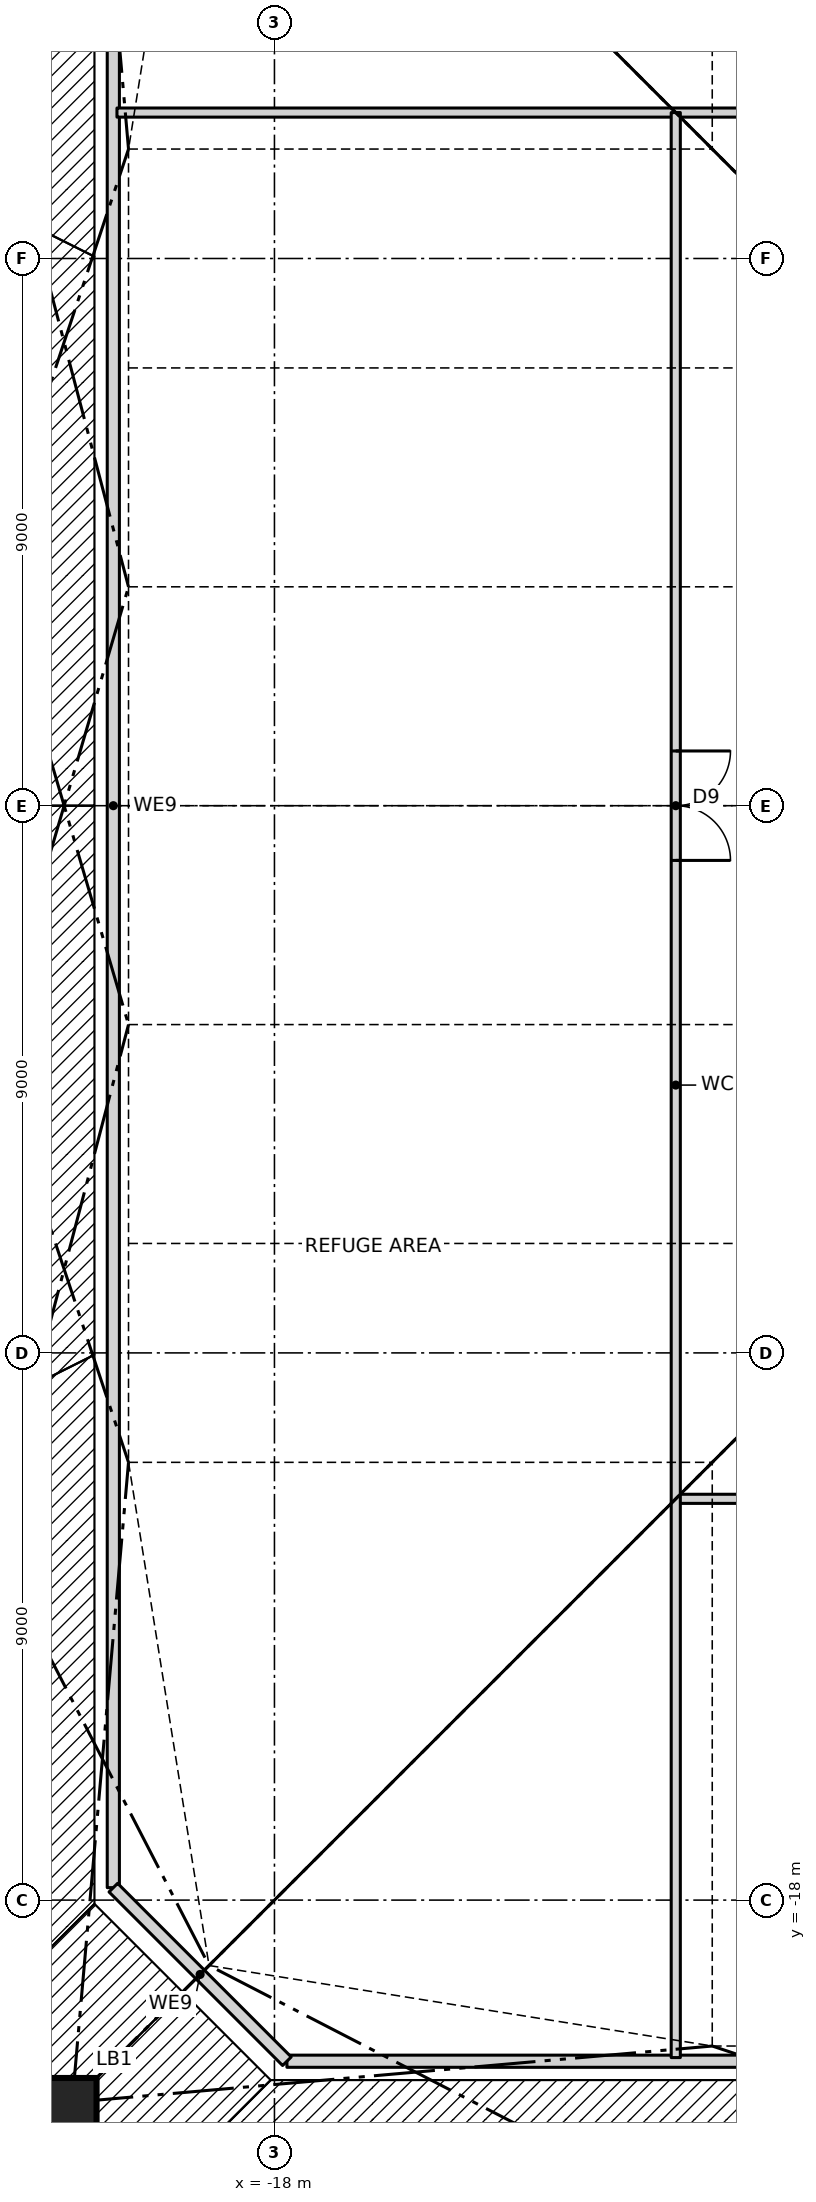
"""IFC4 building model, lengths in metres.
Left out: names, types, materials, properties, quantities, classifications, styles, units other than length and angle.
Written with IfcOpenShell. Run it as: python <this file> out.ifc"""

import sys

from ifc_helpers import new_model, si_unit, direction, frame, frame_2d, origin, origin_2d, place, context, subcontext, project, spatial, rectangle, hollow_rectangle, extrude, clip, halfspace, element, fill, save


model = new_model("IFC4")
c1 = context("Model", 3, precision=1e-05, world=origin(), true_north=direction((0.0, 1.0)))
c2 = subcontext(c1, "Body", "Model", "MODEL_VIEW")
j1 = project(units=[si_unit("LENGTHUNIT", "METRE"), si_unit("PLANEANGLEUNIT", "RADIAN")], contexts=[c1])
p1 = place(None, origin())
s1 = spatial("IfcSite", under=j1, at=p1, CompositionType="ELEMENT")
p2 = place(p1, origin())
s2 = spatial("IfcBuilding", under=s1, at=p2, CompositionType="ELEMENT")
p3 = place(p2, frame((0.0, 0.0, 74.5)))
s3 = spatial("IfcBuildingStorey", under=s2, at=p3, CompositionType="ELEMENT", Elevation=74.5)
p4 = place(p3, frame((-21.326, -21.326, 0.0), z_axis=(0.331294578225, 0.331294578225, 0.883452208599), x_axis=(-0.707106781187, 0.707106781187, 0.0)))
e1 = element("IfcColumn", 1, at=p4, inside=s3, PredefinedType="COLUMN", context=c2, shape_type="Clipping", body=[
    clip(clip(extrude(hollow_rectangle(XDim=0.8, YDim=0.8, WallThickness=0.18, at=origin_2d()), origin(), (0.0, 0.0, 1.0), 6.792), halfspace(frame((0.0, 0.0, 0.0), z_axis=(0.0, -0.468521285666, -0.883452208599), x_axis=(-0.707106781187, -0.624695047554, 0.331294578225)), False)), halfspace(frame((0.0, 2.811, 5.301), z_axis=(0.0, 0.468521285666, 0.883452208599), x_axis=(-0.707106781187, -0.624695047554, 0.331294578225)), False)),
])
p5 = place(p3, frame((-12.15, -22.65, 0.0), z_axis=(0.206127500627, 0.343583115532, 0.91622164142), x_axis=(-0.857517554715, 0.514454704863, 0.0)))
e2 = element("IfcColumn", 2, at=p5, inside=s3, PredefinedType="COLUMN", context=c2, shape_type="Clipping", body=[
    clip(clip(extrude(hollow_rectangle(XDim=0.8, YDim=0.8, WallThickness=0.09, at=origin_2d()), origin(), (0.0, 0.0, 1.0), 6.549), halfspace(frame((0.0, 0.0, 0.0), z_axis=(0.0, -0.400671815572, -0.91622164142), x_axis=(-0.857517554715, -0.471354534126, 0.206127500627)), False)), halfspace(frame((0.0, 2.404, 5.497), z_axis=(0.0, 0.400671815572, 0.91622164142), x_axis=(-0.857517554715, -0.471354534126, 0.206127500627)), False)),
])
p6 = place(p3, frame((-22.65, 12.15, 0.0), z_axis=(0.343583115532, -0.206127500627, 0.91622164142), x_axis=(0.514454704863, 0.857517554715, 0.0)))
e3 = element("IfcColumn", 3, at=p6, inside=s3, PredefinedType="COLUMN", context=c2, shape_type="Clipping", body=[
    clip(clip(extrude(hollow_rectangle(XDim=0.8, YDim=0.8, WallThickness=0.09, at=origin_2d()), origin(), (0.0, 0.0, 1.0), 6.549), halfspace(frame((0.0, 0.0, 0.0), z_axis=(0.0, -0.400671815572, -0.91622164142), x_axis=(0.514454704863, -0.785676141527, 0.343583115532)), False)), halfspace(frame((0.0, 2.404, 5.497), z_axis=(0.0, 0.400671815572, 0.91622164142), x_axis=(0.514454704863, -0.785676141527, 0.343583115532)), False)),
])
p7 = place(p3, frame((-22.65, 4.05, 0.0), z_axis=(0.350261033367, -0.070044605522, 0.934029422311), x_axis=(0.196095673508, 0.980584767795, 0.0)))
e4 = element("IfcColumn", 4, at=p7, inside=s3, PredefinedType="COLUMN", context=c2, shape_type="Clipping", body=[
    clip(clip(extrude(hollow_rectangle(XDim=0.8, YDim=0.8, WallThickness=0.09, at=origin_2d()), origin(), (0.0, 0.0, 1.0), 6.424), halfspace(frame((0.0, 0.0, 0.0), z_axis=(0.0, -0.357196078167, -0.934029422311), x_axis=(0.196095673508, -0.91589502419, 0.350261033367)), False)), halfspace(frame((0.0, 2.143, 5.604), z_axis=(0.0, 0.357196078167, 0.934029422311), x_axis=(0.196095673508, -0.91589502419, 0.350261033367)), False)),
])
p8 = place(p3, frame((-22.65, -4.05, 0.0), z_axis=(0.350261033367, 0.070044605522, 0.934029422311), x_axis=(-0.196095673508, 0.980584767795, 0.0)))
e5 = element("IfcColumn", 5, at=p8, inside=s3, PredefinedType="COLUMN", context=c2, shape_type="Clipping", body=[
    clip(clip(extrude(hollow_rectangle(XDim=0.8, YDim=0.8, WallThickness=0.09, at=origin_2d()), origin(), (0.0, 0.0, 1.0), 6.424), halfspace(frame((0.0, 0.0, 0.0), z_axis=(0.0, -0.357196078167, -0.934029422311), x_axis=(-0.196095673508, -0.91589502419, 0.350261033367)), False)), halfspace(frame((0.0, 2.143, 5.604), z_axis=(0.0, 0.357196078167, 0.934029422311), x_axis=(-0.196095673508, -0.91589502419, 0.350261033367)), False)),
])
p9 = place(p3, frame((-22.65, -12.15, 0.0), z_axis=(0.343583115532, 0.206127500627, 0.91622164142), x_axis=(-0.514454704863, 0.857517554715, 0.0)))
e6 = element("IfcColumn", 6, at=p9, inside=s3, PredefinedType="COLUMN", context=c2, shape_type="Clipping", body=[
    clip(clip(extrude(hollow_rectangle(XDim=0.8, YDim=0.8, WallThickness=0.09, at=origin_2d()), origin(), (0.0, 0.0, 1.0), 6.549), halfspace(frame((0.0, 0.0, 0.0), z_axis=(0.0, -0.400671815572, -0.91622164142), x_axis=(-0.514454704863, -0.785676141527, 0.343583115532)), False)), halfspace(frame((0.0, 2.404, 5.497), z_axis=(0.0, 0.400671815572, 0.91622164142), x_axis=(-0.514454704863, -0.785676141527, 0.343583115532)), False)),
])
for number, where, z_axis, x_axis in (
    (7, (-17.795, -20.65, 0.0), (0.0, 0.0, 1.0), (1.0, 0.0, 0.0)),
    (8, (-20.65, 17.795, 0.0), (0.0, 0.0, 1.0), (0.0, -1.0, 0.0)),
):
    element("IfcWall", number, at=place(p3, frame(where, z_axis=z_axis, x_axis=x_axis)), inside=s3, PredefinedType="PARTITIONING", context=c2, shape_type="SweptSolid", body=[
        extrude(rectangle(XDim=35.59, YDim=0.2, at=frame_2d((17.795, 0.0))), origin(), (0.0, 0.0, 1.0), 5.7),
    ])
p10 = place(p3, frame((-20.65, -17.795, 0.0), z_axis=(0.0, 0.0, 1.0), x_axis=(0.707106781187, -0.707106781187, 0.0)))
e9 = element("IfcWall", 9, at=p10, inside=s3, PredefinedType="PARTITIONING", context=c2, shape_type="SweptSolid", body=[
    extrude(rectangle(XDim=4.038, YDim=0.2, at=frame_2d((2.019, 0.0))), origin(), (0.0, 0.0, 1.0), 5.7),
])
p11 = place(p3, frame((-11.4, -11.4, 0.0), z_axis=(0.0, 0.0, 1.0), x_axis=(1.0, 0.0, 0.0)))
e10 = element("IfcWall", 10, at=p11, inside=s3, PredefinedType="PARTITIONING", context=c2, shape_type="SweptSolid", body=[
    extrude(rectangle(XDim=31.99, YDim=0.15, at=frame_2d((15.995, 0.0))), origin(), (0.0, 0.0, 1.0), 5.77),
])
p12 = place(p11, frame((4.1, 0.0, 0.0)))
e11 = element("IfcOpeningElement", 11, at=p12, cuts=e10, PredefinedType="OPENING", context=c2, shape_type="SweptSolid", body=[
    extrude(rectangle(XDim=1.8, YDim=2.1, at=frame_2d((0.9, 1.05))), frame((0.0, 0.085, 0.0), z_axis=(0.0, -1.0, 0.0), x_axis=(1.0, 0.0, 0.0)), (0.0, 0.0, 1.0), 0.17),
])
p13 = place(p11, frame((12.6, 0.0, 0.0)))
e12 = element("IfcOpeningElement", 12, at=p13, cuts=e10, PredefinedType="OPENING", context=c2, shape_type="SweptSolid", body=[
    extrude(rectangle(XDim=1.8, YDim=2.1, at=frame_2d((0.9, 1.05))), frame((0.0, 0.085, 0.0), z_axis=(0.0, -1.0, 0.0), x_axis=(1.0, 0.0, 0.0)), (0.0, 0.0, 1.0), 0.17),
])
p14 = place(p11, frame((19.0, 0.0, 0.0)))
e13 = element("IfcOpeningElement", 13, at=p14, cuts=e10, PredefinedType="OPENING", context=c2, shape_type="SweptSolid", body=[
    extrude(rectangle(XDim=1.8, YDim=2.1, at=frame_2d((0.9, 1.05))), frame((0.0, 0.085, 0.0), z_axis=(0.0, -1.0, 0.0), x_axis=(1.0, 0.0, 0.0)), (0.0, 0.0, 1.0), 0.17),
])
p15 = place(p3, frame((-20.59, 11.4, 0.0), z_axis=(0.0, 0.0, 1.0), x_axis=(1.0, 0.0, 0.0)))
e14 = element("IfcWall", 14, at=p15, inside=s3, PredefinedType="PARTITIONING", context=c2, shape_type="SweptSolid", body=[
    extrude(rectangle(XDim=31.99, YDim=0.15, at=frame_2d((15.995, 0.0))), origin(), (0.0, 0.0, 1.0), 5.77),
])
p16 = place(p15, frame((27.59, 0.0, 0.0)))
e15 = element("IfcOpeningElement", 15, at=p16, cuts=e14, PredefinedType="OPENING", context=c2, shape_type="SweptSolid", body=[
    extrude(rectangle(XDim=1.8, YDim=2.1, at=frame_2d((0.9, 1.05))), frame((0.0, 0.085, 0.0), z_axis=(0.0, -1.0, 0.0), x_axis=(1.0, 0.0, 0.0)), (0.0, 0.0, 1.0), 0.17),
])
p17 = place(p15, frame((20.09, 0.0, 0.0)))
e16 = element("IfcOpeningElement", 16, at=p17, cuts=e14, PredefinedType="OPENING", context=c2, shape_type="SweptSolid", body=[
    extrude(rectangle(XDim=1.8, YDim=2.1, at=frame_2d((0.9, 1.05))), frame((0.0, 0.085, 0.0), z_axis=(0.0, -1.0, 0.0), x_axis=(1.0, 0.0, 0.0)), (0.0, 0.0, 1.0), 0.17),
])
p18 = place(p15, frame((12.19, 0.0, 0.0)))
e17 = element("IfcOpeningElement", 17, at=p18, cuts=e14, PredefinedType="OPENING", context=c2, shape_type="SweptSolid", body=[
    extrude(rectangle(XDim=1.8, YDim=2.1, at=frame_2d((0.9, 1.05))), frame((0.0, 0.085, 0.0), z_axis=(0.0, -1.0, 0.0), x_axis=(1.0, 0.0, 0.0)), (0.0, 0.0, 1.0), 0.17),
])
p19 = place(p3, frame((-11.4, -20.59, 0.0), z_axis=(0.0, 0.0, 1.0), x_axis=(0.0, 1.0, 0.0)))
e18 = element("IfcWall", 18, at=p19, inside=s3, PredefinedType="PARTITIONING", context=c2, shape_type="SweptSolid", body=[
    extrude(rectangle(XDim=31.99, YDim=0.15, at=frame_2d((15.995, 0.0))), origin(), (0.0, 0.0, 1.0), 5.77),
])
p20 = place(p19, frame((19.69, 0.0, 0.0)))
e19 = element("IfcOpeningElement", 19, at=p20, cuts=e18, PredefinedType="OPENING", context=c2, shape_type="SweptSolid", body=[
    extrude(rectangle(XDim=1.8, YDim=2.1, at=frame_2d((0.9, 1.05))), frame((0.0, 0.085, 0.0), z_axis=(0.0, -1.0, 0.0), x_axis=(1.0, 0.0, 0.0)), (0.0, 0.0, 1.0), 0.17),
])
p21 = place(p20, frame((1.8, 0.0, 0.0), z_axis=(0.0, 0.0, 1.0), x_axis=(-1.0, 0.0, 0.0)))
e20 = element("IfcDoor", 20, at=p21, inside=s3, OperationType="DOUBLE_DOOR_SINGLE_SWING", PredefinedType="DOOR", context=c2, shape_type="SweptSolid", body=[
    extrude(rectangle(XDim=1.8, YDim=2.1, at=frame_2d((0.9, 1.05))), frame((0.0, 0.025, 0.0), z_axis=(0.0, -1.0, 0.0), x_axis=(1.0, 0.0, 0.0)), (0.0, 0.0, 1.0), 0.05),
])
fill(e19, e20)
save(model, sys.argv[1])
